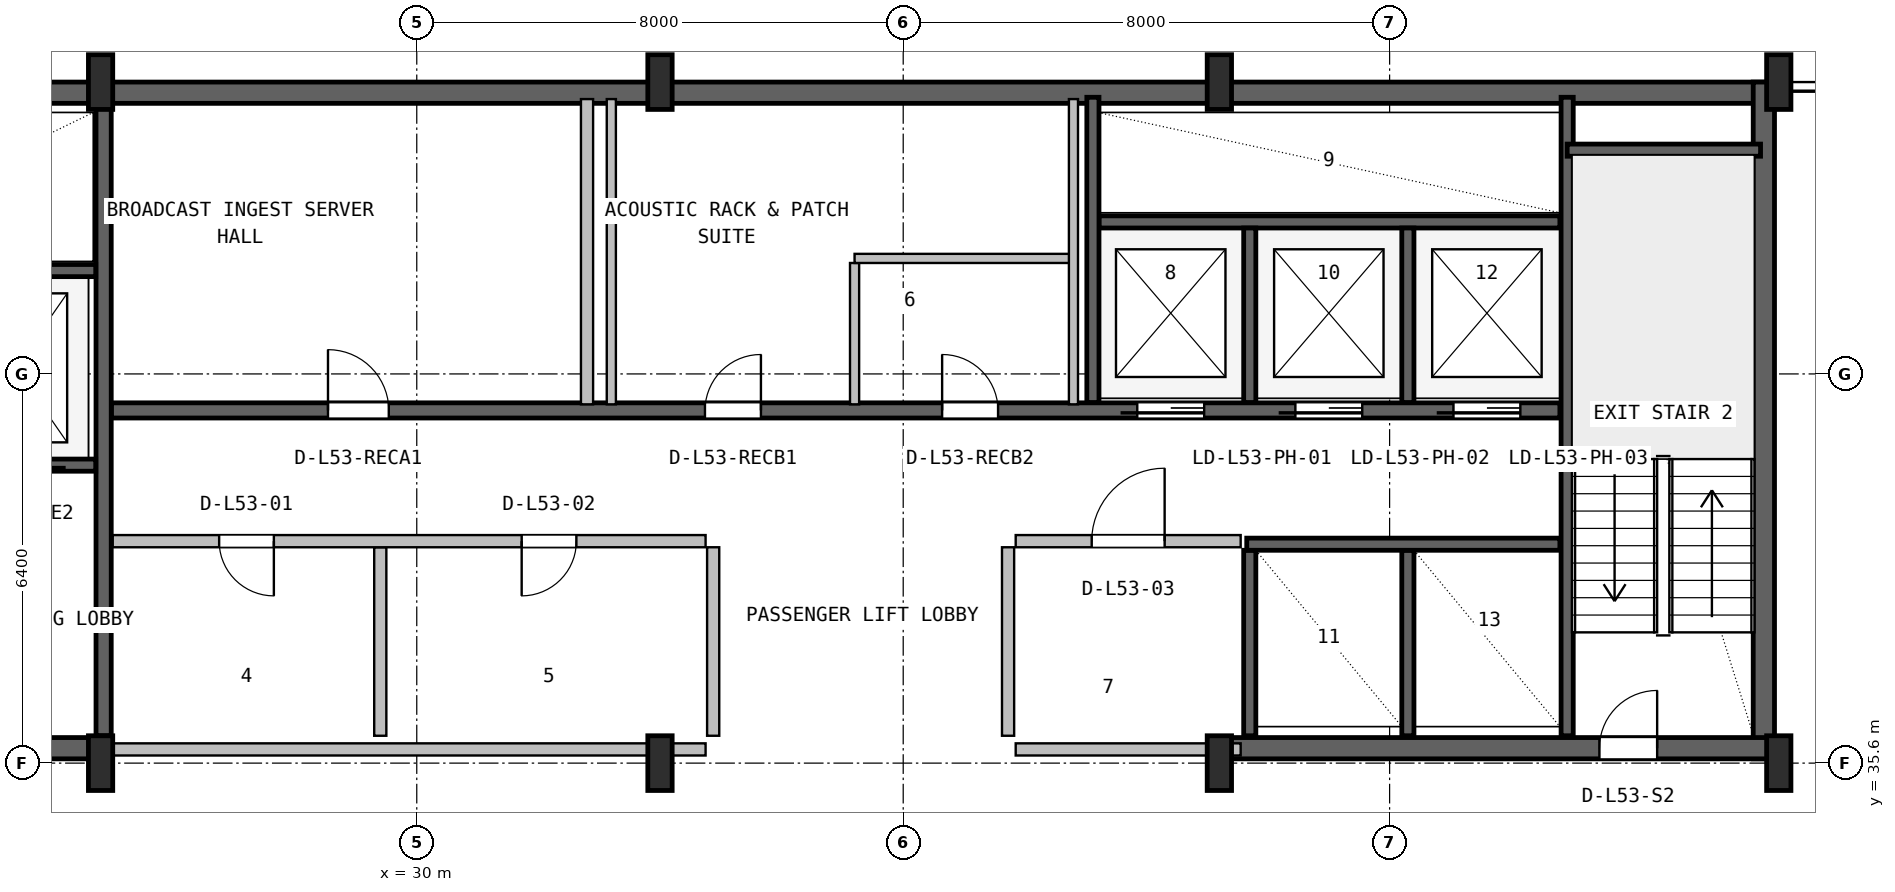
"""IFC4 building model, lengths in metres.
Left out: names, types, materials, properties, quantities, classifications, styles, units other than length and angle.
Written with IfcOpenShell. Run it as: python <this file> out.ifc"""

import sys

from ifc_helpers import new_model, si_unit, direction, frame, frame_2d, origin, origin_2d, place, context, subcontext, project, spatial, rectangle, i_section, extrude, source, transform, mapped, element, fill, save


model = new_model("IFC4")
c1 = context("Model", 3, precision=1e-05, world=origin(), true_north=direction((0.0, 1.0)))
c2 = subcontext(c1, "Body", "Model", "MODEL_VIEW")
j1 = project(units=[si_unit("LENGTHUNIT", "METRE"), si_unit("PLANEANGLEUNIT", "RADIAN")], contexts=[c1])
p1 = place(None, origin())
s1 = spatial("IfcSite", under=j1, at=p1, CompositionType="ELEMENT")
p2 = place(p1, origin())
s2 = spatial("IfcBuilding", under=s1, at=p2, CompositionType="ELEMENT")
p3 = place(p2, frame((0.0, 0.0, 215.0)))
s3 = spatial("IfcBuildingStorey", under=s2, at=p3, CompositionType="ELEMENT", Elevation=215.0)
p4 = place(p3, frame((15.6, 46.625, 0.0), z_axis=(0.0, 0.0, 1.0), x_axis=(1.0, 0.0, 0.0)))
e1 = element("IfcWall", 1, at=p4, inside=s3, PredefinedType="SHEAR", context=c2, shape_type="SweptSolid", body=[
    extrude(rectangle(XDim=36.8, YDim=0.35, at=frame_2d((18.4, 0.0))), origin(), (0.0, 0.0, 1.0), 3.55),
])
p5 = place(p3, frame((52.155, 35.67, 0.0), z_axis=(0.0, 0.0, 1.0), x_axis=(0.0, 1.0, 0.0)))
e2 = element("IfcWall", 2, at=p5, inside=s3, PredefinedType="SHEAR", context=c2, shape_type="SweptSolid", body=[
    extrude(rectangle(XDim=11.13, YDim=0.35, at=frame_2d((5.565, 0.0))), origin(), (0.0, 0.0, 1.0), 3.55),
])
p6 = place(p3, frame((15.67, 35.845, 0.0), z_axis=(0.0, 0.0, 1.0), x_axis=(1.0, 0.0, 0.0)))
e3 = element("IfcWall", 3, at=p6, inside=s3, PredefinedType="SHEAR", context=c2, shape_type="SweptSolid", body=[
    extrude(rectangle(XDim=9.13, YDim=0.35, at=frame_2d((4.565, 0.0))), origin(), (0.0, 0.0, 1.0), 3.55),
])
p7 = place(p6, frame((5.4, 0.0, 0.0)))
e4 = element("IfcOpeningElement", 4, at=p7, cuts=e3, PredefinedType="OPENING", context=c2, shape_type="SweptSolid", body=[
    extrude(rectangle(XDim=1.0, YDim=2.1, at=frame_2d((0.5, 1.05))), frame((0.0, 0.185, 0.0), z_axis=(0.0, -1.0, 0.0), x_axis=(1.0, 0.0, 0.0)), (0.0, 0.0, 1.0), 0.37),
])
p8 = place(p3, frame((43.2, 35.845, 0.0), z_axis=(0.0, 0.0, 1.0), x_axis=(1.0, 0.0, 0.0)))
e5 = element("IfcWall", 5, at=p8, inside=s3, PredefinedType="SHEAR", context=c2, shape_type="SweptSolid", body=[
    extrude(rectangle(XDim=9.13, YDim=0.35, at=frame_2d((4.565, 0.0))), origin(), (0.0, 0.0, 1.0), 3.55),
])
p9 = place(p8, frame((6.25, 0.0, 0.0)))
e6 = element("IfcOpeningElement", 6, at=p9, cuts=e5, PredefinedType="OPENING", context=c2, shape_type="SweptSolid", body=[
    extrude(rectangle(XDim=0.95, YDim=2.1, at=frame_2d((0.475, 1.05))), frame((0.0, 0.185, 0.0), z_axis=(0.0, -1.0, 0.0), x_axis=(1.0, 0.0, 0.0)), (0.0, 0.0, 1.0), 0.37),
])
m1 = source(origin(), c2, "Body", "SweptSolid", [
    extrude(i_section(OverallWidth=0.4, OverallDepth=0.9, WebThickness=0.016, FlangeThickness=0.028, FilletRadius=0.016, at=origin_2d()), origin(), (0.0, 0.0, 1.0), 3.8),
])
for number, where, z_axis, x_axis in (
    (7, (24.8, 35.6, 0.0), (0.0, 0.0, 1.0), (1.0, 0.0, 0.0)),
    (8, (24.8, 46.8, 0.0), (0.0, 0.0, 1.0), (1.0, 0.0, 0.0)),
    (9, (34.0, 35.6, 0.0), (0.0, 0.0, 1.0), (1.0, 0.0, 0.0)),
    (10, (34.0, 46.8, 0.0), (0.0, 0.0, 1.0), (1.0, 0.0, 0.0)),
    (11, (43.2, 35.6, 0.0), (0.0, 0.0, 1.0), (1.0, 0.0, 0.0)),
    (12, (43.2, 46.8, 0.0), (0.0, 0.0, 1.0), (1.0, 0.0, 0.0)),
    (13, (52.4, 35.6, 0.0), (0.0, 0.0, 1.0), (1.0, 0.0, 0.0)),
    (14, (52.4, 46.8, 0.0), (0.0, 0.0, 1.0), (1.0, 0.0, 0.0)),
):
    element("IfcColumn", number, at=place(p3, frame(where, z_axis=z_axis, x_axis=x_axis)), inside=s3, PredefinedType="COLUMN", context=c2, shape_type="MappedRepresentation", body=[
        mapped(m1, transform((0.0, 0.0, 0.0), x_axis=(1.0, 0.0, 0.0), y_axis=(0.0, 1.0, 0.0), z_axis=(0.0, 0.0, 1.0), scale=1.0)),
    ])
p10 = place(p3, frame((24.85, 36.05, 0.0), z_axis=(0.0, 0.0, 1.0), x_axis=(0.0, 1.0, 0.0)))
e15 = element("IfcWall", 15, at=p10, inside=s3, PredefinedType="SHEAR", context=c2, shape_type="SweptSolid", body=[
    extrude(rectangle(XDim=10.45, YDim=0.25, at=frame_2d((5.225, 0.0))), origin(), (0.0, 0.0, 1.0), 3.55),
])
p11 = place(p3, frame((19.2, 40.5, 0.0), z_axis=(0.0, 0.0, 1.0), x_axis=(1.0, 0.0, 0.0)))
e16 = element("IfcWall", 16, at=p11, inside=s3, PredefinedType="SHEAR", context=c2, shape_type="SweptSolid", body=[
    extrude(rectangle(XDim=5.52, YDim=0.2, at=frame_2d((2.76, 0.0))), origin(), (0.0, 0.0, 1.0), 3.55),
])
p12 = place(p11, frame((1.05, 0.0, 0.0)))
e17 = element("IfcOpeningElement", 17, at=p12, cuts=e16, PredefinedType="OPENING", context=c2, shape_type="SweptSolid", body=[
    extrude(rectangle(XDim=1.1, YDim=2.18, at=frame_2d((0.55, 1.09))), frame((0.0, 0.11, 0.0), z_axis=(0.0, -1.0, 0.0), x_axis=(1.0, 0.0, 0.0)), (0.0, 0.0, 1.0), 0.22),
])
p13 = place(p11, frame((3.65, 0.0, 0.0)))
e18 = element("IfcOpeningElement", 18, at=p13, cuts=e16, PredefinedType="OPENING", context=c2, shape_type="SweptSolid", body=[
    extrude(rectangle(XDim=1.1, YDim=2.18, at=frame_2d((0.55, 1.09))), frame((0.0, 0.11, 0.0), z_axis=(0.0, -1.0, 0.0), x_axis=(1.0, 0.0, 0.0)), (0.0, 0.0, 1.0), 0.22),
])
p14 = place(p3, frame((19.2, 43.7, 0.0), z_axis=(0.0, 0.0, 1.0), x_axis=(1.0, 0.0, 0.0)))
e19 = element("IfcWall", 19, at=p14, inside=s3, PredefinedType="SHEAR", context=c2, shape_type="SweptSolid", body=[
    extrude(rectangle(XDim=5.52, YDim=0.2, at=frame_2d((2.76, 0.0))), origin(), (0.0, 0.0, 1.0), 3.55),
])
p15 = place(p3, frame((48.92, 36.05, 0.0), z_axis=(0.0, 0.0, 1.0), x_axis=(0.0, 1.0, 0.0)))
e20 = element("IfcWall", 20, at=p15, inside=s3, PredefinedType="SHEAR", context=c2, shape_type="SweptSolid", body=[
    extrude(rectangle(XDim=10.5, YDim=0.2, at=frame_2d((5.25, 0.0))), origin(), (0.0, 0.0, 1.0), 3.55),
])
p16 = place(p3, frame((48.92, 45.68, 0.0), z_axis=(0.0, 0.0, 1.0), x_axis=(1.0, 0.0, 0.0)))
e21 = element("IfcWall", 21, at=p16, inside=s3, PredefinedType="SHEAR", context=c2, shape_type="SweptSolid", body=[
    extrude(rectangle(XDim=3.18, YDim=0.2, at=frame_2d((1.59, 0.0))), origin(), (0.0, 0.0, 1.0), 3.55),
])
p17 = place(p3, frame((24.98, 41.4, 0.0), z_axis=(0.0, 0.0, 1.0), x_axis=(1.0, 0.0, 0.0)))
e22 = element("IfcWall", 22, at=p17, inside=s3, PredefinedType="SHEAR", context=c2, shape_type="SweptSolid", body=[
    extrude(rectangle(XDim=23.82, YDim=0.25, at=frame_2d((11.91, 0.0))), origin(), (0.0, 0.0, 1.0), 3.55),
])
p18 = place(p17, frame((16.87, 0.0, 0.0)))
e23 = element("IfcOpeningElement", 23, at=p18, cuts=e22, PredefinedType="OPENING", context=c2, shape_type="SweptSolid", body=[
    extrude(rectangle(XDim=1.1, YDim=2.18, at=frame_2d((0.55, 1.09))), frame((0.0, 0.135, 0.0), z_axis=(0.0, -1.0, 0.0), x_axis=(1.0, 0.0, 0.0)), (0.0, 0.0, 1.0), 0.27),
])
p19 = place(p17, frame((19.47, 0.0, 0.0)))
e24 = element("IfcOpeningElement", 24, at=p19, cuts=e22, PredefinedType="OPENING", context=c2, shape_type="SweptSolid", body=[
    extrude(rectangle(XDim=1.1, YDim=2.18, at=frame_2d((0.55, 1.09))), frame((0.0, 0.135, 0.0), z_axis=(0.0, -1.0, 0.0), x_axis=(1.0, 0.0, 0.0)), (0.0, 0.0, 1.0), 0.27),
])
p20 = place(p17, frame((22.07, 0.0, 0.0)))
e25 = element("IfcOpeningElement", 25, at=p20, cuts=e22, PredefinedType="OPENING", context=c2, shape_type="SweptSolid", body=[
    extrude(rectangle(XDim=1.1, YDim=2.18, at=frame_2d((0.55, 1.09))), frame((0.0, 0.135, 0.0), z_axis=(0.0, -1.0, 0.0), x_axis=(1.0, 0.0, 0.0)), (0.0, 0.0, 1.0), 0.27),
])
p21 = place(p17, frame((3.56, 0.0, 0.0)))
e26 = element("IfcOpeningElement", 26, at=p21, cuts=e22, PredefinedType="OPENING", context=c2, shape_type="SweptSolid", body=[
    extrude(rectangle(XDim=1.0, YDim=2.08, at=frame_2d((0.5, 1.04))), frame((0.0, 0.135, 0.0), z_axis=(0.0, -1.0, 0.0), x_axis=(1.0, 0.0, 0.0)), (0.0, 0.0, 1.0), 0.27),
])
p22 = place(p17, frame((9.76, 0.0, 0.0)))
e27 = element("IfcOpeningElement", 27, at=p22, cuts=e22, PredefinedType="OPENING", context=c2, shape_type="SweptSolid", body=[
    extrude(rectangle(XDim=0.92, YDim=2.08, at=frame_2d((0.46, 1.04))), frame((0.0, 0.135, 0.0), z_axis=(0.0, -1.0, 0.0), x_axis=(1.0, 0.0, 0.0)), (0.0, 0.0, 1.0), 0.27),
])
p23 = place(p17, frame((13.66, 0.0, 0.0)))
e28 = element("IfcOpeningElement", 28, at=p23, cuts=e22, PredefinedType="OPENING", context=c2, shape_type="SweptSolid", body=[
    extrude(rectangle(XDim=0.92, YDim=2.08, at=frame_2d((0.46, 1.04))), frame((0.0, 0.135, 0.0), z_axis=(0.0, -1.0, 0.0), x_axis=(1.0, 0.0, 0.0)), (0.0, 0.0, 1.0), 0.27),
])
p24 = place(p3, frame((41.22, 44.5, 0.0), z_axis=(0.0, 0.0, 1.0), x_axis=(1.0, 0.0, 0.0)))
e29 = element("IfcWall", 29, at=p24, inside=s3, PredefinedType="SHEAR", context=c2, shape_type="SweptSolid", body=[
    extrude(rectangle(XDim=7.58, YDim=0.2, at=frame_2d((3.79, 0.0))), origin(), (0.0, 0.0, 1.0), 3.55),
])
p25 = place(p3, frame((41.12, 41.53, 0.0), z_axis=(0.0, 0.0, 1.0), x_axis=(0.0, 1.0, 0.0)))
e30 = element("IfcWall", 30, at=p25, inside=s3, PredefinedType="SHEAR", context=c2, shape_type="SweptSolid", body=[
    extrude(rectangle(XDim=5.02, YDim=0.2, at=frame_2d((2.51, 0.0))), origin(), (0.0, 0.0, 1.0), 3.55),
])
for number, where, z_axis, x_axis in (
    (31, (43.7, 41.53, 0.0), (0.0, 0.0, 1.0), (0.0, 1.0, 0.0)),
    (32, (46.3, 41.53, 0.0), (0.0, 0.0, 1.0), (0.0, 1.0, 0.0)),
):
    element("IfcWall", number, at=place(p3, frame(where, z_axis=z_axis, x_axis=x_axis)), inside=s3, PredefinedType="SHEAR", context=c2, shape_type="SweptSolid", body=[
        extrude(rectangle(XDim=2.87, YDim=0.2, at=frame_2d((1.435, 0.0))), origin(), (0.0, 0.0, 1.0), 3.55),
    ])
for number, where, z_axis, x_axis in (
    (33, (43.7, 36.05, 0.0), (0.0, 0.0, 1.0), (0.0, 1.0, 0.0)),
    (34, (46.3, 36.05, 0.0), (0.0, 0.0, 1.0), (0.0, 1.0, 0.0)),
):
    element("IfcWall", number, at=place(p3, frame(where, z_axis=z_axis, x_axis=x_axis)), inside=s3, PredefinedType="SHEAR", context=c2, shape_type="SweptSolid", body=[
        extrude(rectangle(XDim=3.05, YDim=0.2, at=frame_2d((1.525, 0.0))), origin(), (0.0, 0.0, 1.0), 3.55),
    ])
p26 = place(p3, frame((43.65, 39.2, 0.0), z_axis=(0.0, 0.0, 1.0), x_axis=(1.0, 0.0, 0.0)))
e35 = element("IfcWall", 35, at=p26, inside=s3, PredefinedType="SHEAR", context=c2, shape_type="SweptSolid", body=[
    extrude(rectangle(XDim=5.15, YDim=0.2, at=frame_2d((2.575, 0.0))), origin(), (0.0, 0.0, 1.0), 3.55),
])
p27 = place(p3, frame((25.0, 35.825, 0.0), z_axis=(0.0, 0.0, 1.0), x_axis=(1.0, 0.0, 0.0)))
e36 = element("IfcWall", 36, at=p27, inside=s3, PredefinedType="PLUMBINGWALL", context=c2, shape_type="SweptSolid", body=[
    extrude(rectangle(XDim=9.75, YDim=0.2, at=frame_2d((4.875, 0.0))), origin(), (0.0, 0.0, 1.0), 2.575),
])
p28 = place(p3, frame((29.4, 36.05, 0.0), z_axis=(0.0, 0.0, 1.0), x_axis=(0.0, 1.0, 0.0)))
e37 = element("IfcWall", 37, at=p28, inside=s3, PredefinedType="PLUMBINGWALL", context=c2, shape_type="SweptSolid", body=[
    extrude(rectangle(XDim=3.1, YDim=0.2, at=frame_2d((1.55, 0.0))), origin(), (0.0, 0.0, 1.0), 3.53),
])
p29 = place(p3, frame((25.0, 39.25, 0.0), z_axis=(0.0, 0.0, 1.0), x_axis=(1.0, 0.0, 0.0)))
e38 = element("IfcWall", 38, at=p29, inside=s3, PredefinedType="PLUMBINGWALL", context=c2, shape_type="SweptSolid", body=[
    extrude(rectangle(XDim=9.75, YDim=0.2, at=frame_2d((4.875, 0.0))), origin(), (0.0, 0.0, 1.0), 3.53),
])
p30 = place(p29, frame((1.75, 0.0, 0.0)))
e39 = element("IfcOpeningElement", 39, at=p30, cuts=e38, PredefinedType="OPENING", context=c2, shape_type="SweptSolid", body=[
    extrude(rectangle(XDim=0.9, YDim=2.06, at=frame_2d((0.45, 1.03))), frame((0.0, 0.11, 0.0), z_axis=(0.0, -1.0, 0.0), x_axis=(1.0, 0.0, 0.0)), (0.0, 0.0, 1.0), 0.22),
])
p31 = place(p29, frame((6.725, 0.0, 0.0)))
e40 = element("IfcOpeningElement", 40, at=p31, cuts=e38, PredefinedType="OPENING", context=c2, shape_type="SweptSolid", body=[
    extrude(rectangle(XDim=0.9, YDim=2.06, at=frame_2d((0.45, 1.03))), frame((0.0, 0.11, 0.0), z_axis=(0.0, -1.0, 0.0), x_axis=(1.0, 0.0, 0.0)), (0.0, 0.0, 1.0), 0.22),
])
p32 = place(p3, frame((34.875, 36.05, 0.0), z_axis=(0.0, 0.0, 1.0), x_axis=(0.0, 1.0, 0.0)))
e41 = element("IfcWall", 41, at=p32, inside=s3, PredefinedType="PLUMBINGWALL", context=c2, shape_type="SweptSolid", body=[
    extrude(rectangle(XDim=3.1, YDim=0.2, at=frame_2d((1.55, 0.0))), origin(), (0.0, 0.0, 1.0), 3.53),
])
p33 = place(p3, frame((39.85, 35.825, 0.0), z_axis=(0.0, 0.0, 1.0), x_axis=(1.0, 0.0, 0.0)))
e42 = element("IfcWall", 42, at=p33, inside=s3, PredefinedType="SOLIDWALL", context=c2, shape_type="SweptSolid", body=[
    extrude(rectangle(XDim=3.7, YDim=0.2, at=frame_2d((1.85, 0.0))), origin(), (0.0, 0.0, 1.0), 2.575),
])
p34 = place(p3, frame((39.85, 39.25, 0.0), z_axis=(0.0, 0.0, 1.0), x_axis=(1.0, 0.0, 0.0)))
e43 = element("IfcWall", 43, at=p34, inside=s3, PredefinedType="SOLIDWALL", context=c2, shape_type="SweptSolid", body=[
    extrude(rectangle(XDim=3.7, YDim=0.2, at=frame_2d((1.85, 0.0))), origin(), (0.0, 0.0, 1.0), 3.53),
])
p35 = place(p34, frame((1.25, 0.0, 0.0)))
e44 = element("IfcOpeningElement", 44, at=p35, cuts=e43, PredefinedType="OPENING", context=c2, shape_type="SweptSolid", body=[
    extrude(rectangle(XDim=1.2, YDim=2.1, at=frame_2d((0.6, 1.05))), frame((0.0, 0.11, 0.0), z_axis=(0.0, -1.0, 0.0), x_axis=(1.0, 0.0, 0.0)), (0.0, 0.0, 1.0), 0.22),
])
p36 = place(p3, frame((39.725, 36.05, 0.0), z_axis=(0.0, 0.0, 1.0), x_axis=(0.0, 1.0, 0.0)))
e45 = element("IfcWall", 45, at=p36, inside=s3, PredefinedType="SOLIDWALL", context=c2, shape_type="SweptSolid", body=[
    extrude(rectangle(XDim=3.1, YDim=0.2, at=frame_2d((1.55, 0.0))), origin(), (0.0, 0.0, 1.0), 3.53),
])
p37 = place(p3, frame((32.8, 41.5, 0.0), z_axis=(0.0, 0.0, 1.0), x_axis=(0.0, 1.0, 0.0)))
e46 = element("IfcWall", 46, at=p37, inside=s3, PredefinedType="SOLIDWALL", context=c2, shape_type="SweptSolid", body=[
    extrude(rectangle(XDim=5.02, YDim=0.2, at=frame_2d((2.51, 0.0))), origin(), (0.0, 0.0, 1.0), 3.53),
])
p38 = place(p3, frame((37.2, 41.5, 0.0), z_axis=(0.0, 0.0, 1.0), x_axis=(0.0, 1.0, 0.0)))
e47 = element("IfcWall", 47, at=p38, inside=s3, PredefinedType="PARTITIONING", context=c2, shape_type="SweptSolid", body=[
    extrude(rectangle(XDim=2.325, YDim=0.15, at=frame_2d((1.163, 0.0))), origin(), (0.0, 0.0, 1.0), 3.53),
])
p39 = place(p3, frame((37.2, 43.9, 0.0), z_axis=(0.0, 0.0, 1.0), x_axis=(1.0, 0.0, 0.0)))
e48 = element("IfcWall", 48, at=p39, inside=s3, PredefinedType="PARTITIONING", context=c2, shape_type="SweptSolid", body=[
    extrude(rectangle(XDim=3.6, YDim=0.15, at=frame_2d((1.8, 0.0))), origin(), (0.0, 0.0, 1.0), 3.53),
])
for number, where, z_axis, x_axis in (
    (49, (40.8, 41.5, 0.0), (0.0, 0.0, 1.0), (0.0, 1.0, 0.0)),
    (50, (33.2, 41.5, 0.0), (0.0, 0.0, 1.0), (0.0, 1.0, 0.0)),
):
    element("IfcWall", number, at=place(p3, frame(where, z_axis=z_axis, x_axis=x_axis)), inside=s3, PredefinedType="PARTITIONING", context=c2, shape_type="SweptSolid", body=[
        extrude(rectangle(XDim=5.02, YDim=0.15, at=frame_2d((2.51, 0.0))), origin(), (0.0, 0.0, 1.0), 3.53),
    ])
m2 = source(origin(), c2, "Body", "SweptSolid", [
    extrude(rectangle(XDim=0.95, YDim=2.1, at=frame_2d((0.475, 1.05))), frame((0.0, 0.025, 0.0), z_axis=(0.0, -1.0, 0.0), x_axis=(1.0, 0.0, 0.0)), (0.0, 0.0, 1.0), 0.05),
])
p40 = place(p9, origin())
e51 = element("IfcDoor", 51, at=p40, inside=s3, OperationType="SINGLE_SWING_RIGHT", PredefinedType="DOOR", context=c2, shape_type="MappedRepresentation", body=[
    mapped(m2, transform((0.0, 0.0, 0.0), x_axis=(1.0, 0.0, 0.0), y_axis=(0.0, 1.0, 0.0), z_axis=(0.0, 0.0, 1.0), scale=1.0)),
])
fill(e6, e51)
m3 = source(origin(), c2, "Body", "SweptSolid", [
    extrude(rectangle(XDim=1.1, YDim=2.18, at=frame_2d((0.55, 1.09))), frame((0.0, 0.025, 0.0), z_axis=(0.0, -1.0, 0.0), x_axis=(1.0, 0.0, 0.0)), (0.0, 0.0, 1.0), 0.05),
])
p41 = place(p18, frame((1.1, 0.0, 0.0), z_axis=(0.0, 0.0, 1.0), x_axis=(-1.0, 0.0, 0.0)))
e52 = element("IfcDoor", 52, at=p41, inside=s3, OperationType="SLIDING_TO_LEFT", PredefinedType="DOOR", context=c2, shape_type="MappedRepresentation", body=[
    mapped(m3, transform((0.0, 0.0, 0.0), x_axis=(1.0, 0.0, 0.0), y_axis=(0.0, 1.0, 0.0), z_axis=(0.0, 0.0, 1.0), scale=1.0)),
])
fill(e23, e52)
p42 = place(p19, frame((1.1, 0.0, 0.0), z_axis=(0.0, 0.0, 1.0), x_axis=(-1.0, 0.0, 0.0)))
e53 = element("IfcDoor", 53, at=p42, inside=s3, OperationType="SLIDING_TO_LEFT", PredefinedType="DOOR", context=c2, shape_type="MappedRepresentation", body=[
    mapped(m3, transform((0.0, 0.0, 0.0), x_axis=(1.0, 0.0, 0.0), y_axis=(0.0, 1.0, 0.0), z_axis=(0.0, 0.0, 1.0), scale=1.0)),
])
fill(e24, e53)
p43 = place(p20, frame((1.1, 0.0, 0.0), z_axis=(0.0, 0.0, 1.0), x_axis=(-1.0, 0.0, 0.0)))
e54 = element("IfcDoor", 54, at=p43, inside=s3, OperationType="SLIDING_TO_LEFT", PredefinedType="DOOR", context=c2, shape_type="MappedRepresentation", body=[
    mapped(m3, transform((0.0, 0.0, 0.0), x_axis=(1.0, 0.0, 0.0), y_axis=(0.0, 1.0, 0.0), z_axis=(0.0, 0.0, 1.0), scale=1.0)),
])
fill(e25, e54)
m4 = source(origin(), c2, "Body", "SweptSolid", [
    extrude(rectangle(XDim=1.0, YDim=2.08, at=frame_2d((0.5, 1.04))), frame((0.0, 0.025, 0.0), z_axis=(0.0, -1.0, 0.0), x_axis=(1.0, 0.0, 0.0)), (0.0, 0.0, 1.0), 0.05),
])
p44 = place(p21, origin())
e55 = element("IfcDoor", 55, at=p44, inside=s3, OperationType="SINGLE_SWING_LEFT", PredefinedType="DOOR", context=c2, shape_type="MappedRepresentation", body=[
    mapped(m4, transform((0.0, 0.0, 0.0), x_axis=(1.0, 0.0, 0.0), y_axis=(0.0, 1.0, 0.0), z_axis=(0.0, 0.0, 1.0), scale=1.0)),
])
fill(e26, e55)
m5 = source(origin(), c2, "Body", "SweptSolid", [
    extrude(rectangle(XDim=0.92, YDim=2.08, at=frame_2d((0.46, 1.04))), frame((0.0, 0.025, 0.0), z_axis=(0.0, -1.0, 0.0), x_axis=(1.0, 0.0, 0.0)), (0.0, 0.0, 1.0), 0.05),
])
p45 = place(p22, origin())
e56 = element("IfcDoor", 56, at=p45, inside=s3, OperationType="SINGLE_SWING_RIGHT", PredefinedType="DOOR", context=c2, shape_type="MappedRepresentation", body=[
    mapped(m5, transform((0.0, 0.0, 0.0), x_axis=(1.0, 0.0, 0.0), y_axis=(0.0, 1.0, 0.0), z_axis=(0.0, 0.0, 1.0), scale=1.0)),
])
fill(e27, e56)
p46 = place(p23, origin())
e57 = element("IfcDoor", 57, at=p46, inside=s3, OperationType="SINGLE_SWING_LEFT", PredefinedType="DOOR", context=c2, shape_type="MappedRepresentation", body=[
    mapped(m5, transform((0.0, 0.0, 0.0), x_axis=(1.0, 0.0, 0.0), y_axis=(0.0, 1.0, 0.0), z_axis=(0.0, 0.0, 1.0), scale=1.0)),
])
fill(e28, e57)
m6 = source(origin(), c2, "Body", "SweptSolid", [
    extrude(rectangle(XDim=0.9, YDim=2.06, at=frame_2d((0.45, 1.03))), frame((0.0, 0.025, 0.0), z_axis=(0.0, -1.0, 0.0), x_axis=(1.0, 0.0, 0.0)), (0.0, 0.0, 1.0), 0.05),
])
p47 = place(p30, frame((0.9, 0.0, 0.0), z_axis=(0.0, 0.0, 1.0), x_axis=(-1.0, 0.0, 0.0)))
e58 = element("IfcDoor", 58, at=p47, inside=s3, OperationType="SINGLE_SWING_RIGHT", PredefinedType="DOOR", context=c2, shape_type="MappedRepresentation", body=[
    mapped(m6, transform((0.0, 0.0, 0.0), x_axis=(1.0, 0.0, 0.0), y_axis=(0.0, 1.0, 0.0), z_axis=(0.0, 0.0, 1.0), scale=1.0)),
])
fill(e39, e58)
p48 = place(p31, frame((0.9, 0.0, 0.0), z_axis=(0.0, 0.0, 1.0), x_axis=(-1.0, 0.0, 0.0)))
e59 = element("IfcDoor", 59, at=p48, inside=s3, OperationType="SINGLE_SWING_LEFT", PredefinedType="DOOR", context=c2, shape_type="MappedRepresentation", body=[
    mapped(m6, transform((0.0, 0.0, 0.0), x_axis=(1.0, 0.0, 0.0), y_axis=(0.0, 1.0, 0.0), z_axis=(0.0, 0.0, 1.0), scale=1.0)),
])
fill(e40, e59)
m7 = source(origin(), c2, "Body", "SweptSolid", [
    extrude(rectangle(XDim=1.2, YDim=2.1, at=frame_2d((0.6, 1.05))), frame((0.0, 0.025, 0.0), z_axis=(0.0, -1.0, 0.0), x_axis=(1.0, 0.0, 0.0)), (0.0, 0.0, 1.0), 0.05),
])
p49 = place(p35, origin())
e60 = element("IfcDoor", 60, at=p49, inside=s3, OperationType="SINGLE_SWING_RIGHT", PredefinedType="DOOR", context=c2, shape_type="MappedRepresentation", body=[
    mapped(m7, transform((0.0, 0.0, 0.0), x_axis=(1.0, 0.0, 0.0), y_axis=(0.0, 1.0, 0.0), z_axis=(0.0, 0.0, 1.0), scale=1.0)),
])
fill(e44, e60)
save(model, sys.argv[1])
